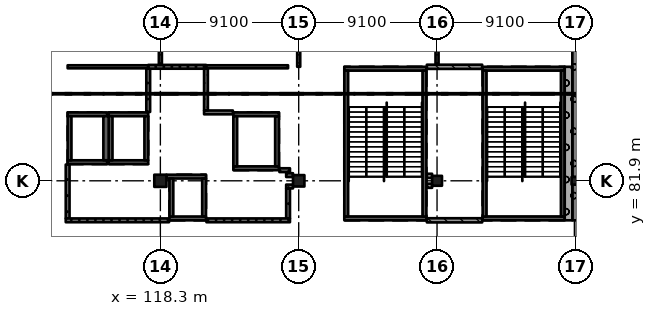
"""IFC4 building model, lengths in metres.
Left out: names, types, materials, properties, quantities, classifications, styles, units other than length and angle.
Written with IfcOpenShell. Run it as: python <this file> out.ifc"""

import sys

from ifc_helpers import new_model, si_unit, direction, frame, frame_2d, origin, origin_2d, place, context, subcontext, project, spatial, rectangle, extrude, element, fill, save


model = new_model("IFC4")
c1 = context("Model", 3, precision=1e-05, world=origin(), true_north=direction((0.0, 1.0)))
c2 = subcontext(c1, "Body", "Model", "MODEL_VIEW")
j1 = project(units=[si_unit("LENGTHUNIT", "METRE"), si_unit("PLANEANGLEUNIT", "RADIAN")], contexts=[c1])
p1 = place(None, origin())
s1 = spatial("IfcSite", under=j1, at=p1, CompositionType="ELEMENT")
p2 = place(p1, origin())
s2 = spatial("IfcBuilding", under=s1, at=p2, CompositionType="ELEMENT")
p3 = place(p2, frame((0.0, 0.0, 6.37)))
s3 = spatial("IfcBuildingStorey", under=s2, at=p3, CompositionType="ELEMENT", Elevation=6.37)
p4 = place(p3, frame((118.3, 81.9, 0.0), z_axis=(0.0, 0.0, 1.0), x_axis=(1.0, 0.0, 0.0)))
e1 = element("IfcColumn", 1, at=p4, inside=s3, PredefinedType="COLUMN", context=c2, shape_type="SweptSolid", body=[
    extrude(rectangle(XDim=0.8, YDim=0.8, at=origin_2d()), origin(), (0.0, 0.0, 1.0), 4.55),
])
p5 = place(p3, frame((127.4, 81.9, 0.0), z_axis=(0.0, 0.0, 1.0), x_axis=(1.0, 0.0, 0.0)))
e2 = element("IfcColumn", 2, at=p5, inside=s3, PredefinedType="COLUMN", context=c2, shape_type="SweptSolid", body=[
    extrude(rectangle(XDim=0.75, YDim=0.75, at=origin_2d()), origin(), (0.0, 0.0, 1.0), 4.55),
])
p6 = place(p3, frame((136.5, 81.9, 0.0), z_axis=(0.0, 0.0, 1.0), x_axis=(1.0, 0.0, 0.0)))
e3 = element("IfcColumn", 3, at=p6, inside=s3, PredefinedType="COLUMN", context=c2, shape_type="SweptSolid", body=[
    extrude(rectangle(XDim=0.65, YDim=0.65, at=origin_2d()), origin(), (0.0, 0.0, 1.0), 4.55),
])
p7 = place(p3, frame((145.6, 81.9, 0.0), z_axis=(0.0, 0.0, 1.0), x_axis=(1.0, 0.0, 0.0)))
e4 = element("IfcColumn", 4, at=p7, inside=s3, PredefinedType="COLUMN", context=c2, shape_type="SweptSolid", body=[
    extrude(rectangle(XDim=0.5, YDim=0.5, at=origin_2d()), origin(), (0.0, 0.0, 1.0), 4.55),
])
p8 = place(p3, frame((117.5, 83.125, 0.0), z_axis=(0.0, 0.0, 1.0), x_axis=(-1.0, 0.0, 0.0)))
e5 = element("IfcWall", 5, at=p8, inside=s3, PredefinedType="SHEAR", context=c2, shape_type="SweptSolid", body=[
    extrude(rectangle(XDim=2.6, YDim=0.25, at=frame_2d((1.3, 0.0))), origin(), (0.0, 0.0, 1.0), 4.55),
])
p9 = place(p3, frame((117.5, 86.275, 0.0), z_axis=(0.0, 0.0, 1.0), x_axis=(-1.0, 0.0, 0.0)))
e6 = element("IfcWall", 6, at=p9, inside=s3, PredefinedType="SHEAR", context=c2, shape_type="SweptSolid", body=[
    extrude(rectangle(XDim=2.6, YDim=0.25, at=frame_2d((1.3, 0.0))), origin(), (0.0, 0.0, 1.0), 4.55),
])
p10 = place(p9, frame((0.8, 0.0, 0.0)))
e7 = element("IfcOpeningElement", 7, at=p10, cuts=e6, PredefinedType="OPENING", context=c2, shape_type="SweptSolid", body=[
    extrude(rectangle(XDim=1.0, YDim=2.1, at=frame_2d((0.5, 1.05))), frame((0.0, 0.135, 0.0), z_axis=(0.0, -1.0, 0.0), x_axis=(1.0, 0.0, 0.0)), (0.0, 0.0, 1.0), 0.27),
])
for number, where, z_axis, x_axis in (
    (8, (115.025, 86.15, 0.0), (0.0, 0.0, 1.0), (0.0, -1.0, 0.0)),
    (9, (117.375, 86.15, 0.0), (0.0, 0.0, 1.0), (0.0, -1.0, 0.0)),
):
    element("IfcWall", number, at=place(p3, frame(where, z_axis=z_axis, x_axis=x_axis)), inside=s3, PredefinedType="SHEAR", context=c2, shape_type="SweptSolid", body=[
        extrude(rectangle(XDim=2.9, YDim=0.25, at=frame_2d((1.45, 0.0))), origin(), (0.0, 0.0, 1.0), 4.55),
    ])
p11 = place(p3, frame((114.8, 83.125, 0.0), z_axis=(0.0, 0.0, 1.0), x_axis=(-1.0, 0.0, 0.0)))
e10 = element("IfcWall", 10, at=p11, inside=s3, PredefinedType="SHEAR", context=c2, shape_type="SweptSolid", body=[
    extrude(rectangle(XDim=2.6, YDim=0.25, at=frame_2d((1.3, 0.0))), origin(), (0.0, 0.0, 1.0), 4.55),
])
p12 = place(p3, frame((114.8, 86.275, 0.0), z_axis=(0.0, 0.0, 1.0), x_axis=(-1.0, 0.0, 0.0)))
e11 = element("IfcWall", 11, at=p12, inside=s3, PredefinedType="SHEAR", context=c2, shape_type="SweptSolid", body=[
    extrude(rectangle(XDim=2.6, YDim=0.25, at=frame_2d((1.3, 0.0))), origin(), (0.0, 0.0, 1.0), 4.55),
])
p13 = place(p12, frame((0.8, 0.0, 0.0)))
e12 = element("IfcOpeningElement", 12, at=p13, cuts=e11, PredefinedType="OPENING", context=c2, shape_type="SweptSolid", body=[
    extrude(rectangle(XDim=1.0, YDim=2.1, at=frame_2d((0.5, 1.05))), frame((0.0, 0.135, 0.0), z_axis=(0.0, -1.0, 0.0), x_axis=(1.0, 0.0, 0.0)), (0.0, 0.0, 1.0), 0.27),
])
p14 = place(p3, frame((112.325, 86.15, 0.0), z_axis=(0.0, 0.0, 1.0), x_axis=(0.0, -1.0, 0.0)))
e13 = element("IfcWall", 13, at=p14, inside=s3, PredefinedType="SHEAR", context=c2, shape_type="SweptSolid", body=[
    extrude(rectangle(XDim=2.9, YDim=0.25, at=frame_2d((1.45, 0.0))), origin(), (0.0, 0.0, 1.0), 4.55),
])
p15 = place(p3, frame((114.725, 86.15, 0.0), z_axis=(0.0, 0.0, 1.0), x_axis=(0.0, -1.0, 0.0)))
e14 = element("IfcWall", 14, at=p15, inside=s3, PredefinedType="SHEAR", context=c2, shape_type="SweptSolid", body=[
    extrude(rectangle(XDim=2.9, YDim=0.35, at=frame_2d((1.45, 0.0))), origin(), (0.0, 0.0, 1.0), 4.55),
])
p16 = place(p3, frame((121.3, 79.425, 0.0), z_axis=(0.0, 0.0, 1.0), x_axis=(-1.0, 0.0, 0.0)))
e15 = element("IfcWall", 15, at=p16, inside=s3, PredefinedType="SHEAR", context=c2, shape_type="SweptSolid", body=[
    extrude(rectangle(XDim=2.4, YDim=0.25, at=frame_2d((1.2, 0.0))), origin(), (0.0, 0.0, 1.0), 4.55),
])
p17 = place(p3, frame((121.3, 82.175, 0.0), z_axis=(0.0, 0.0, 1.0), x_axis=(-1.0, 0.0, 0.0)))
e16 = element("IfcWall", 16, at=p17, inside=s3, PredefinedType="SHEAR", context=c2, shape_type="SweptSolid", body=[
    extrude(rectangle(XDim=2.6, YDim=0.25, at=frame_2d((1.3, 0.0))), origin(), (0.0, 0.0, 1.0), 4.55),
])
p18 = place(p3, frame((119.025, 82.05, 0.0), z_axis=(0.0, 0.0, 1.0), x_axis=(0.0, -1.0, 0.0)))
e17 = element("IfcWall", 17, at=p18, inside=s3, PredefinedType="SHEAR", context=c2, shape_type="SweptSolid", body=[
    extrude(rectangle(XDim=2.5, YDim=0.25, at=frame_2d((1.25, 0.0))), origin(), (0.0, 0.0, 1.0), 4.55),
])
p19 = place(p3, frame((121.175, 82.05, 0.0), z_axis=(0.0, 0.0, 1.0), x_axis=(0.0, -1.0, 0.0)))
e18 = element("IfcWall", 18, at=p19, inside=s3, PredefinedType="SHEAR", context=c2, shape_type="SweptSolid", body=[
    extrude(rectangle(XDim=2.5, YDim=0.25, at=frame_2d((1.25, 0.0))), origin(), (0.0, 0.0, 1.0), 4.55),
])
p20 = place(p19, frame((0.9, 0.0, 0.0)))
e19 = element("IfcOpeningElement", 19, at=p20, cuts=e18, PredefinedType="OPENING", context=c2, shape_type="SweptSolid", body=[
    extrude(rectangle(XDim=0.7, YDim=2.1, at=frame_2d((0.35, 1.05))), frame((0.0, 0.135, 0.0), z_axis=(0.0, -1.0, 0.0), x_axis=(1.0, 0.0, 0.0)), (0.0, 0.0, 1.0), 0.27),
])
p21 = place(p3, frame((126.1, 82.725, 0.0), z_axis=(0.0, 0.0, 1.0), x_axis=(-1.0, 0.0, 0.0)))
e20 = element("IfcWall", 20, at=p21, inside=s3, PredefinedType="SHEAR", context=c2, shape_type="SweptSolid", body=[
    extrude(rectangle(XDim=3.0, YDim=0.25, at=frame_2d((1.5, 0.0))), origin(), (0.0, 0.0, 1.0), 4.55),
])
p22 = place(p3, frame((126.1, 86.275, 0.0), z_axis=(0.0, 0.0, 1.0), x_axis=(-1.0, 0.0, 0.0)))
e21 = element("IfcWall", 21, at=p22, inside=s3, PredefinedType="SHEAR", context=c2, shape_type="SweptSolid", body=[
    extrude(rectangle(XDim=3.0, YDim=0.25, at=frame_2d((1.5, 0.0))), origin(), (0.0, 0.0, 1.0), 4.55),
])
p23 = place(p22, frame((0.95, 0.0, 0.0)))
e22 = element("IfcOpeningElement", 22, at=p23, cuts=e21, PredefinedType="OPENING", context=c2, shape_type="SweptSolid", body=[
    extrude(rectangle(XDim=1.1, YDim=2.1, at=frame_2d((0.55, 1.05))), frame((0.0, 0.135, 0.0), z_axis=(0.0, -1.0, 0.0), x_axis=(1.0, 0.0, 0.0)), (0.0, 0.0, 1.0), 0.27),
])
for number, where, z_axis, x_axis in (
    (23, (123.225, 86.15, 0.0), (0.0, 0.0, 1.0), (0.0, -1.0, 0.0)),
    (24, (125.975, 86.15, 0.0), (0.0, 0.0, 1.0), (0.0, -1.0, 0.0)),
):
    element("IfcWall", number, at=place(p3, frame(where, z_axis=z_axis, x_axis=x_axis)), inside=s3, PredefinedType="SHEAR", context=c2, shape_type="SweptSolid", body=[
        extrude(rectangle(XDim=3.3, YDim=0.25, at=frame_2d((1.65, 0.0))), origin(), (0.0, 0.0, 1.0), 4.55),
    ])
p24 = place(p3, frame((144.9, 79.425, 0.0), z_axis=(0.0, 0.0, 1.0), x_axis=(-1.0, 0.0, 0.0)))
e25 = element("IfcWall", 25, at=p24, inside=s3, PredefinedType="SHEAR", context=c2, shape_type="SweptSolid", body=[
    extrude(rectangle(XDim=5.4, YDim=0.25, at=frame_2d((2.7, 0.0))), origin(), (0.0, 0.0, 1.0), 4.55),
])
p25 = place(p3, frame((144.9, 89.275, 0.0), z_axis=(0.0, 0.0, 1.0), x_axis=(-1.0, 0.0, 0.0)))
e26 = element("IfcWall", 26, at=p25, inside=s3, PredefinedType="SHEAR", context=c2, shape_type="SweptSolid", body=[
    extrude(rectangle(XDim=5.4, YDim=0.25, at=frame_2d((2.7, 0.0))), origin(), (0.0, 0.0, 1.0), 4.55),
])
p26 = place(p25, frame((1.5, 0.0, 0.0)))
e27 = element("IfcOpeningElement", 27, at=p26, cuts=e26, PredefinedType="OPENING", context=c2, shape_type="SweptSolid", body=[
    extrude(rectangle(XDim=2.4, YDim=2.1, at=frame_2d((1.2, 1.05))), frame((0.0, 0.135, 0.0), z_axis=(0.0, -1.0, 0.0), x_axis=(1.0, 0.0, 0.0)), (0.0, 0.0, 1.0), 0.27),
])
for number, where, z_axis, x_axis in (
    (28, (139.625, 89.15, 0.0), (0.0, 0.0, 1.0), (0.0, -1.0, 0.0)),
    (29, (144.775, 89.15, 0.0), (0.0, 0.0, 1.0), (0.0, -1.0, 0.0)),
):
    element("IfcWall", number, at=place(p3, frame(where, z_axis=z_axis, x_axis=x_axis)), inside=s3, PredefinedType="SHEAR", context=c2, shape_type="SweptSolid", body=[
        extrude(rectangle(XDim=9.6, YDim=0.25, at=frame_2d((4.8, 0.0))), origin(), (0.0, 0.0, 1.0), 4.55),
    ])
p27 = place(p3, frame((135.8, 79.425, 0.0), z_axis=(0.0, 0.0, 1.0), x_axis=(-1.0, 0.0, 0.0)))
e30 = element("IfcWall", 30, at=p27, inside=s3, PredefinedType="SHEAR", context=c2, shape_type="SweptSolid", body=[
    extrude(rectangle(XDim=5.4, YDim=0.25, at=frame_2d((2.7, 0.0))), origin(), (0.0, 0.0, 1.0), 4.55),
])
p28 = place(p3, frame((135.8, 89.275, 0.0), z_axis=(0.0, 0.0, 1.0), x_axis=(-1.0, 0.0, 0.0)))
e31 = element("IfcWall", 31, at=p28, inside=s3, PredefinedType="SHEAR", context=c2, shape_type="SweptSolid", body=[
    extrude(rectangle(XDim=5.4, YDim=0.25, at=frame_2d((2.7, 0.0))), origin(), (0.0, 0.0, 1.0), 4.55),
])
p29 = place(p28, frame((1.5, 0.0, 0.0)))
e32 = element("IfcOpeningElement", 32, at=p29, cuts=e31, PredefinedType="OPENING", context=c2, shape_type="SweptSolid", body=[
    extrude(rectangle(XDim=2.4, YDim=2.1, at=frame_2d((1.2, 1.05))), frame((0.0, 0.135, 0.0), z_axis=(0.0, -1.0, 0.0), x_axis=(1.0, 0.0, 0.0)), (0.0, 0.0, 1.0), 0.27),
])
for number, where, z_axis, x_axis in (
    (33, (130.525, 89.15, 0.0), (0.0, 0.0, 1.0), (0.0, -1.0, 0.0)),
    (34, (135.675, 89.15, 0.0), (0.0, 0.0, 1.0), (0.0, -1.0, 0.0)),
):
    element("IfcWall", number, at=place(p3, frame(where, z_axis=z_axis, x_axis=x_axis)), inside=s3, PredefinedType="SHEAR", context=c2, shape_type="SweptSolid", body=[
        extrude(rectangle(XDim=9.6, YDim=0.25, at=frame_2d((4.8, 0.0))), origin(), (0.0, 0.0, 1.0), 4.55),
    ])
p30 = place(p3, frame((145.575, 79.3, 0.0), z_axis=(0.0, 0.0, 1.0), x_axis=(0.0, 1.0, 0.0)))
e35 = element("IfcWall", 35, at=p30, inside=s3, PredefinedType="SOLIDWALL", context=c2, shape_type="SweptSolid", body=[
    extrude(rectangle(XDim=2.35, YDim=0.35, at=frame_2d((1.175, 0.0))), origin(), (0.0, 0.0, 1.0), 3.5),
])
p31 = place(p3, frame((145.575, 82.15, 0.0), z_axis=(0.0, 0.0, 1.0), x_axis=(0.0, 1.0, 0.0)))
e36 = element("IfcWall", 36, at=p31, inside=s3, PredefinedType="SOLIDWALL", context=c2, shape_type="SweptSolid", body=[
    extrude(rectangle(XDim=8.55, YDim=0.35, at=frame_2d((4.275, 0.0))), origin(), (0.0, 0.0, 1.0), 3.5),
])
p32 = place(p3, frame((145.15, 79.3, 0.0), z_axis=(0.0, 0.0, 1.0), x_axis=(0.0, 1.0, 0.0)))
e37 = element("IfcWall", 37, at=p32, inside=s3, PredefinedType="SOLIDWALL", context=c2, shape_type="SweptSolid", body=[
    extrude(rectangle(XDim=10.1, YDim=0.5, at=frame_2d((5.05, 0.0))), origin(), (0.0, 0.0, 1.0), 4.55),
])
p33 = place(p3, frame((112.2, 79.425, 0.0), z_axis=(0.0, 0.0, 1.0), x_axis=(0.0, 1.0, 0.0)))
e38 = element("IfcWall", 38, at=p33, inside=s3, PredefinedType="SOLIDWALL", context=c2, shape_type="SweptSolid", body=[
    extrude(rectangle(XDim=3.545, YDim=0.25, at=frame_2d((1.772, 0.0))), origin(), (0.0, 0.0, 1.0), 4.25),
])
p34 = place(p3, frame((112.075, 79.3, 0.0), z_axis=(0.0, 0.0, 1.0), x_axis=(1.0, 0.0, 0.0)))
e39 = element("IfcWall", 39, at=p34, inside=s3, PredefinedType="SOLIDWALL", context=c2, shape_type="SweptSolid", body=[
    extrude(rectangle(XDim=6.795, YDim=0.25, at=frame_2d((3.397, 0.0))), origin(), (0.0, 0.0, 1.0), 4.25),
])
p35 = place(p3, frame((117.5, 86.43, 0.0), z_axis=(0.0, 0.0, 1.0), x_axis=(0.0, 1.0, 0.0)))
e40 = element("IfcWall", 40, at=p35, inside=s3, PredefinedType="SOLIDWALL", context=c2, shape_type="SweptSolid", body=[
    extrude(rectangle(XDim=2.845, YDim=0.25, at=frame_2d((1.422, 0.0))), origin(), (0.0, 0.0, 1.0), 4.25),
])
p36 = place(p3, frame((117.5, 89.4, 0.0), z_axis=(0.0, 0.0, 1.0), x_axis=(-1.0, 0.0, 0.0)))
e41 = element("IfcWall", 41, at=p36, inside=s3, PredefinedType="PARTITIONING", context=c2, shape_type="SweptSolid", body=[
    extrude(rectangle(XDim=5.3, YDim=0.2, at=frame_2d((2.65, 0.0))), origin(), (0.0, 0.0, 1.0), 4.25),
])
p37 = place(p36, frame((1.75, 0.0, 0.0)))
e42 = element("IfcOpeningElement", 42, at=p37, cuts=e41, PredefinedType="OPENING", context=c2, shape_type="SweptSolid", body=[
    extrude(rectangle(XDim=1.8, YDim=2.4, at=frame_2d((0.9, 1.2))), frame((0.0, 0.11, 0.0), z_axis=(0.0, -1.0, 0.0), x_axis=(1.0, 0.0, 0.0)), (0.0, 0.0, 1.0), 0.22),
])
p38 = place(p3, frame((117.5, 89.4, 0.0), z_axis=(0.0, 0.0, 1.0), x_axis=(1.0, 0.0, 0.0)))
e43 = element("IfcWall", 43, at=p38, inside=s3, PredefinedType="SOLIDWALL", context=c2, shape_type="SweptSolid", body=[
    extrude(rectangle(XDim=3.8, YDim=0.25, at=frame_2d((1.9, 0.0))), origin(), (0.0, 0.0, 1.0), 4.25),
])
p39 = place(p38, frame((1.85, 0.0, 0.0)))
e44 = element("IfcOpeningElement", 44, at=p39, cuts=e43, PredefinedType="OPENING", context=c2, shape_type="SweptSolid", body=[
    extrude(rectangle(XDim=0.8, YDim=2.1, at=frame_2d((0.4, 1.05))), frame((0.0, 0.135, 0.0), z_axis=(0.0, -1.0, 0.0), x_axis=(1.0, 0.0, 0.0)), (0.0, 0.0, 1.0), 0.27),
])
p40 = place(p3, frame((118.3, 89.525, 0.0), z_axis=(0.0, 0.0, 1.0), x_axis=(0.0, 1.0, 0.0)))
e45 = element("IfcWall", 45, at=p40, inside=s3, PredefinedType="PARTITIONING", context=c2, shape_type="SweptSolid", body=[
    extrude(rectangle(XDim=1.05, YDim=0.2, at=frame_2d((0.525, 0.0))), origin(), (0.0, 0.0, 1.0), 3.55),
])
p41 = place(p3, frame((121.175, 86.4, 0.0), z_axis=(0.0, 0.0, 1.0), x_axis=(1.0, 0.0, 0.0)))
e46 = element("IfcWall", 46, at=p41, inside=s3, PredefinedType="SOLIDWALL", context=c2, shape_type="SweptSolid", body=[
    extrude(rectangle(XDim=1.895, YDim=0.25, at=frame_2d((0.948, 0.0))), origin(), (0.0, 0.0, 1.0), 4.25),
])
p42 = place(p3, frame((121.3, 89.275, 0.0), z_axis=(0.0, 0.0, 1.0), x_axis=(0.0, -1.0, 0.0)))
e47 = element("IfcWall", 47, at=p42, inside=s3, PredefinedType="SOLIDWALL", context=c2, shape_type="SweptSolid", body=[
    extrude(rectangle(XDim=2.75, YDim=0.25, at=frame_2d((1.375, 0.0))), origin(), (0.0, 0.0, 1.0), 4.25),
])
p43 = place(p3, frame((126.13, 82.6, 0.0), z_axis=(0.0, 0.0, 1.0), x_axis=(1.0, 0.0, 0.0)))
e48 = element("IfcWall", 48, at=p43, inside=s3, PredefinedType="SOLIDWALL", context=c2, shape_type="SweptSolid", body=[
    extrude(rectangle(XDim=0.695, YDim=0.25, at=frame_2d((0.348, 0.0))), origin(), (0.0, 0.0, 1.0), 4.25),
])
p44 = place(p3, frame((126.575, 81.525, 0.0), z_axis=(0.0, 0.0, 1.0), x_axis=(1.0, 0.0, 0.0)))
e49 = element("IfcWall", 49, at=p44, inside=s3, PredefinedType="SOLIDWALL", context=c2, shape_type="SweptSolid", body=[
    extrude(rectangle(XDim=0.45, YDim=0.25, at=frame_2d((0.225, 0.0))), origin(), (0.0, 0.0, 1.0), 4.25),
])
p45 = place(p3, frame((126.7, 79.425, 0.0), z_axis=(0.0, 0.0, 1.0), x_axis=(0.0, 1.0, 0.0)))
e50 = element("IfcWall", 50, at=p45, inside=s3, PredefinedType="SOLIDWALL", context=c2, shape_type="SweptSolid", body=[
    extrude(rectangle(XDim=1.975, YDim=0.25, at=frame_2d((0.987, 0.0))), origin(), (0.0, 0.0, 1.0), 4.25),
])
p46 = place(p3, frame((126.7, 89.4, 0.0), z_axis=(0.0, 0.0, 1.0), x_axis=(-1.0, 0.0, 0.0)))
e51 = element("IfcWall", 51, at=p46, inside=s3, PredefinedType="PARTITIONING", context=c2, shape_type="SweptSolid", body=[
    extrude(rectangle(XDim=5.4, YDim=0.2, at=frame_2d((2.7, 0.0))), origin(), (0.0, 0.0, 1.0), 4.25),
])
p47 = place(p46, frame((1.85, 0.0, 0.0)))
e52 = element("IfcOpeningElement", 52, at=p47, cuts=e51, PredefinedType="OPENING", context=c2, shape_type="SweptSolid", body=[
    extrude(rectangle(XDim=1.8, YDim=2.4, at=frame_2d((0.9, 1.2))), frame((0.0, 0.11, 0.0), z_axis=(0.0, -1.0, 0.0), x_axis=(1.0, 0.0, 0.0)), (0.0, 0.0, 1.0), 0.22),
])
p48 = place(p3, frame((126.825, 79.3, 0.0), z_axis=(0.0, 0.0, 1.0), x_axis=(-1.0, 0.0, 0.0)))
e53 = element("IfcWall", 53, at=p48, inside=s3, PredefinedType="SOLIDWALL", context=c2, shape_type="SweptSolid", body=[
    extrude(rectangle(XDim=5.495, YDim=0.25, at=frame_2d((2.748, 0.0))), origin(), (0.0, 0.0, 1.0), 4.25),
])
p49 = place(p3, frame((127.025, 82.275, 0.0), z_axis=(0.0, 0.0, 1.0), x_axis=(-1.0, 0.0, 0.0)))
e54 = element("IfcWall", 54, at=p49, inside=s3, PredefinedType="SOLIDWALL", context=c2, shape_type="SweptSolid", body=[
    extrude(rectangle(XDim=0.45, YDim=0.25, at=frame_2d((0.225, 0.0))), origin(), (0.0, 0.0, 1.0), 4.25),
])
p50 = place(p3, frame((127.4, 89.4, 0.0), z_axis=(0.0, 0.0, 1.0), x_axis=(0.0, 1.0, 0.0)))
e55 = element("IfcWall", 55, at=p50, inside=s3, PredefinedType="PARTITIONING", context=c2, shape_type="SweptSolid", body=[
    extrude(rectangle(XDim=1.175, YDim=0.2, at=frame_2d((0.587, 0.0))), origin(), (0.0, 0.0, 1.0), 3.55),
])
for number, where, z_axis, x_axis in (
    (56, (135.83, 81.575, 0.0), (0.0, 0.0, 1.0), (1.0, 0.0, 0.0)),
    (57, (136.175, 82.225, 0.0), (0.0, 0.0, 1.0), (-1.0, 0.0, 0.0)),
):
    element("IfcWall", number, at=place(p3, frame(where, z_axis=z_axis, x_axis=x_axis)), inside=s3, PredefinedType="SOLIDWALL", context=c2, shape_type="SweptSolid", body=[
        extrude(rectangle(XDim=0.345, YDim=0.275, at=frame_2d((0.172, 0.0))), origin(), (0.0, 0.0, 1.0), 4.25),
    ])
p51 = place(p3, frame((135.83, 89.4, 0.0), z_axis=(0.0, 0.0, 1.0), x_axis=(1.0, 0.0, 0.0)))
e58 = element("IfcWall", 58, at=p51, inside=s3, PredefinedType="SOLIDWALL", context=c2, shape_type="SweptSolid", body=[
    extrude(rectangle(XDim=3.64, YDim=0.275, at=frame_2d((1.82, 0.0))), origin(), (0.0, 0.0, 1.0), 4.25),
])
p52 = place(p51, frame((1.59, 0.0, 0.0)))
e59 = element("IfcOpeningElement", 59, at=p52, cuts=e58, PredefinedType="OPENING", context=c2, shape_type="SweptSolid", body=[
    extrude(rectangle(XDim=1.2, YDim=2.4, at=frame_2d((0.6, 1.2))), frame((0.0, 0.147, 0.0), z_axis=(0.0, -1.0, 0.0), x_axis=(1.0, 0.0, 0.0)), (0.0, 0.0, 1.0), 0.295),
])
p53 = place(p3, frame((136.5, 89.538, 0.0), z_axis=(0.0, 0.0, 1.0), x_axis=(0.0, 1.0, 0.0)))
e60 = element("IfcWall", 60, at=p53, inside=s3, PredefinedType="PARTITIONING", context=c2, shape_type="SweptSolid", body=[
    extrude(rectangle(XDim=1.062, YDim=0.2, at=frame_2d((0.531, 0.0))), origin(), (0.0, 0.0, 1.0), 3.55),
])
p54 = place(p3, frame((139.47, 79.3, 0.0), z_axis=(0.0, 0.0, 1.0), x_axis=(-1.0, 0.0, 0.0)))
e61 = element("IfcWall", 61, at=p54, inside=s3, PredefinedType="SOLIDWALL", context=c2, shape_type="SweptSolid", body=[
    extrude(rectangle(XDim=3.64, YDim=0.275, at=frame_2d((1.82, 0.0))), origin(), (0.0, 0.0, 1.0), 4.25),
])
p55 = place(p52, origin())
e62 = element("IfcDoor", 62, at=p55, inside=s3, OperationType="SINGLE_SWING_RIGHT", PredefinedType="DOOR", context=c2, shape_type="SweptSolid", body=[
    extrude(rectangle(XDim=1.2, YDim=2.4, at=frame_2d((0.6, 1.2))), frame((0.0, 0.025, 0.0), z_axis=(0.0, -1.0, 0.0), x_axis=(1.0, 0.0, 0.0)), (0.0, 0.0, 1.0), 0.05),
])
fill(e59, e62)
p56 = place(p39, origin())
e63 = element("IfcDoor", 63, at=p56, inside=s3, OperationType="SINGLE_SWING_LEFT", PredefinedType="DOOR", context=c2, shape_type="SweptSolid", body=[
    extrude(rectangle(XDim=0.8, YDim=2.1, at=frame_2d((0.4, 1.05))), frame((0.0, 0.025, 0.0), z_axis=(0.0, -1.0, 0.0), x_axis=(1.0, 0.0, 0.0)), (0.0, 0.0, 1.0), 0.05),
])
fill(e44, e63)
p57 = place(p47, origin())
e64 = element("IfcDoor", 64, at=p57, inside=s3, OperationType="DOUBLE_DOOR_SINGLE_SWING", PredefinedType="DOOR", context=c2, shape_type="SweptSolid", body=[
    extrude(rectangle(XDim=1.8, YDim=2.4, at=frame_2d((0.9, 1.2))), frame((0.0, 0.025, 0.0), z_axis=(0.0, -1.0, 0.0), x_axis=(1.0, 0.0, 0.0)), (0.0, 0.0, 1.0), 0.05),
])
fill(e52, e64)
p58 = place(p37, origin())
e65 = element("IfcDoor", 65, at=p58, inside=s3, OperationType="DOUBLE_DOOR_SINGLE_SWING", PredefinedType="DOOR", context=c2, shape_type="SweptSolid", body=[
    extrude(rectangle(XDim=1.8, YDim=2.4, at=frame_2d((0.9, 1.2))), frame((0.0, 0.025, 0.0), z_axis=(0.0, -1.0, 0.0), x_axis=(1.0, 0.0, 0.0)), (0.0, 0.0, 1.0), 0.05),
])
fill(e42, e65)
p59 = place(p20, origin())
e66 = element("IfcDoor", 66, at=p59, inside=s3, OperationType="SINGLE_SWING_RIGHT", PredefinedType="DOOR", context=c2, shape_type="SweptSolid", body=[
    extrude(rectangle(XDim=0.7, YDim=2.1, at=frame_2d((0.35, 1.05))), frame((0.0, 0.025, 0.0), z_axis=(0.0, -1.0, 0.0), x_axis=(1.0, 0.0, 0.0)), (0.0, 0.0, 1.0), 0.05),
])
fill(e19, e66)
p60 = place(p26, origin())
e67 = element("IfcDoor", 67, at=p60, inside=s3, OperationType="DOUBLE_DOOR_SINGLE_SWING", PredefinedType="DOOR", context=c2, shape_type="SweptSolid", body=[
    extrude(rectangle(XDim=2.4, YDim=2.1, at=frame_2d((1.2, 1.05))), frame((0.0, 0.025, 0.0), z_axis=(0.0, -1.0, 0.0), x_axis=(1.0, 0.0, 0.0)), (0.0, 0.0, 1.0), 0.05),
])
fill(e27, e67)
p61 = place(p29, origin())
e68 = element("IfcDoor", 68, at=p61, inside=s3, OperationType="DOUBLE_DOOR_SINGLE_SWING", PredefinedType="DOOR", context=c2, shape_type="SweptSolid", body=[
    extrude(rectangle(XDim=2.4, YDim=2.1, at=frame_2d((1.2, 1.05))), frame((0.0, 0.025, 0.0), z_axis=(0.0, -1.0, 0.0), x_axis=(1.0, 0.0, 0.0)), (0.0, 0.0, 1.0), 0.05),
])
fill(e32, e68)
p62 = place(p10, origin())
e69 = element("IfcDoor", 69, at=p62, inside=s3, OperationType="DOUBLE_DOOR_SLIDING", PredefinedType="DOOR", context=c2, shape_type="SweptSolid", body=[
    extrude(rectangle(XDim=1.0, YDim=2.1, at=frame_2d((0.5, 1.05))), frame((0.0, 0.025, 0.0), z_axis=(0.0, -1.0, 0.0), x_axis=(1.0, 0.0, 0.0)), (0.0, 0.0, 1.0), 0.05),
])
fill(e7, e69)
p63 = place(p13, origin())
e70 = element("IfcDoor", 70, at=p63, inside=s3, OperationType="DOUBLE_DOOR_SLIDING", PredefinedType="DOOR", context=c2, shape_type="SweptSolid", body=[
    extrude(rectangle(XDim=1.0, YDim=2.1, at=frame_2d((0.5, 1.05))), frame((0.0, 0.025, 0.0), z_axis=(0.0, -1.0, 0.0), x_axis=(1.0, 0.0, 0.0)), (0.0, 0.0, 1.0), 0.05),
])
fill(e12, e70)
p64 = place(p23, origin())
e71 = element("IfcDoor", 71, at=p64, inside=s3, OperationType="DOUBLE_DOOR_SLIDING", PredefinedType="DOOR", context=c2, shape_type="SweptSolid", body=[
    extrude(rectangle(XDim=1.1, YDim=2.1, at=frame_2d((0.55, 1.05))), frame((0.0, 0.025, 0.0), z_axis=(0.0, -1.0, 0.0), x_axis=(1.0, 0.0, 0.0)), (0.0, 0.0, 1.0), 0.05),
])
fill(e22, e71)
save(model, sys.argv[1])
